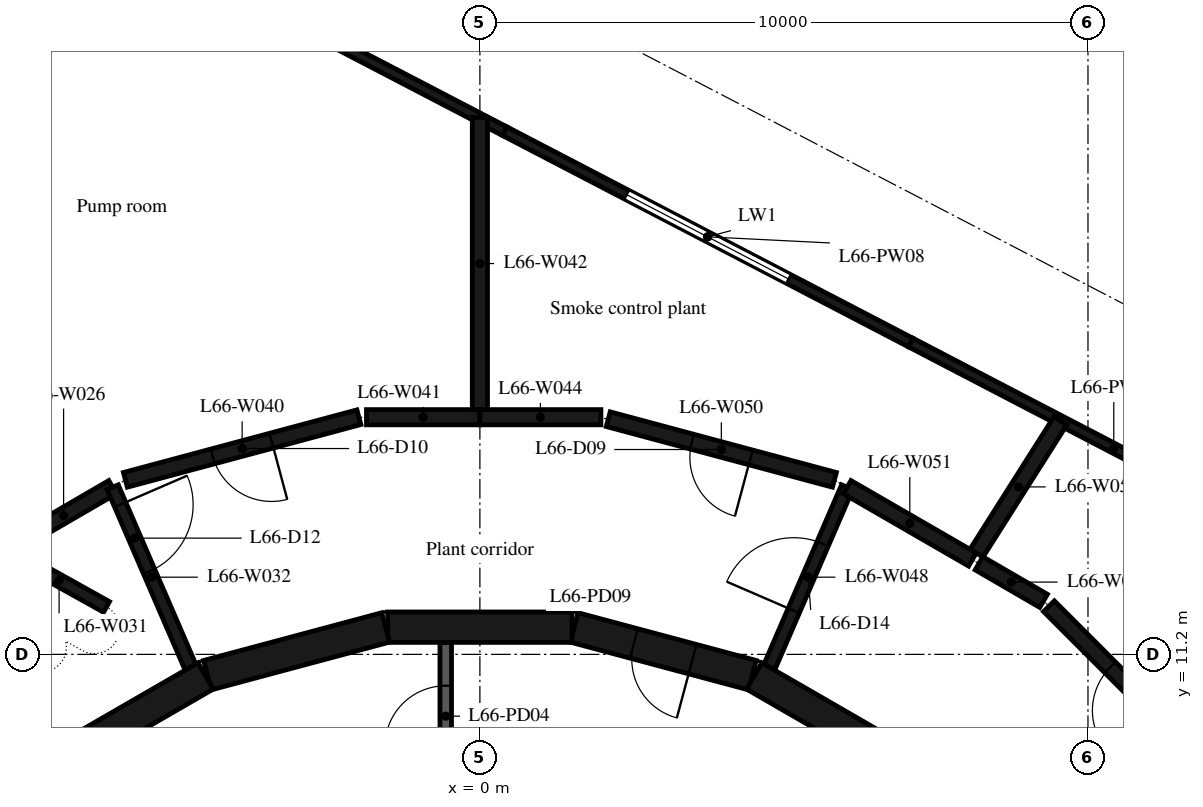
"""IFC4 building model, lengths in metres.
Left out: names, types, materials, properties, quantities, classifications, styles, units other than length and angle.
Written with IfcOpenShell. Run it as: python <this file> out.ifc"""

import sys

from ifc_helpers import new_model, si_unit, direction, frame, frame_2d, origin, place, context, subcontext, project, spatial, rectangle, extrude, element, fill, save


model = new_model("IFC4")
c1 = context("Model", 3, precision=1e-05, world=origin(), true_north=direction((0.0, 1.0)))
c2 = subcontext(c1, "Body", "Model", "MODEL_VIEW")
j1 = project(units=[si_unit("LENGTHUNIT", "METRE"), si_unit("PLANEANGLEUNIT", "RADIAN")], contexts=[c1])
p1 = place(None, origin())
s1 = spatial("IfcSite", under=j1, at=p1, CompositionType="ELEMENT")
p2 = place(p1, origin())
s2 = spatial("IfcBuilding", under=s1, at=p2, CompositionType="ELEMENT")
p3 = place(p2, frame((0.0, 0.0, 258.2)))
s3 = spatial("IfcBuildingStorey", under=s2, at=p3, CompositionType="ELEMENT", Elevation=258.2)
p4 = place(p3, frame((13.764, 12.851, 0.0), z_axis=(0.0, 0.0, 1.0), x_axis=(-0.887013408436, 0.461743666177, 0.0)))
e1 = element("IfcWall", 1, at=p4, inside=s3, PredefinedType="STANDARD", context=c2, shape_type="SweptSolid", body=[
    extrude(rectangle(XDim=7.53, YDim=0.16, at=frame_2d((3.765, 0.0))), origin(), (0.0, 0.0, 1.0), 4.75),
])
p5 = place(p4, frame((0.696, 0.0, 1.0)))
e2 = element("IfcOpeningElement", 2, at=p5, cuts=e1, PredefinedType="OPENING", context=c2, shape_type="SweptSolid", body=[
    extrude(rectangle(XDim=1.2, YDim=2.2, at=frame_2d((0.6, 1.1))), frame((0.0, 0.09, 0.0), z_axis=(0.0, -1.0, 0.0), x_axis=(1.0, 0.0, 0.0)), (0.0, 0.0, 1.0), 0.18),
])
p6 = place(p3, frame((7.085, 16.328, 0.0), z_axis=(0.0, 0.0, 1.0), x_axis=(-0.887019775052, 0.46173143565, 0.0)))
e3 = element("IfcWall", 3, at=p6, inside=s3, PredefinedType="STANDARD", context=c2, shape_type="SweptSolid", body=[
    extrude(rectangle(XDim=7.53, YDim=0.16, at=frame_2d((3.765, 0.0))), origin(), (0.0, 0.0, 1.0), 4.75),
])
p7 = place(p6, frame((2.265, 0.0, 1.0)))
e4 = element("IfcOpeningElement", 4, at=p7, cuts=e3, PredefinedType="OPENING", context=c2, shape_type="SweptSolid", body=[
    extrude(rectangle(XDim=3.0, YDim=2.2, at=frame_2d((1.5, 1.1))), frame((0.0, 0.09, 0.0), z_axis=(0.0, -1.0, 0.0), x_axis=(1.0, 0.0, 0.0)), (0.0, 0.0, 1.0), 0.18),
])
p8 = place(p3, frame((0.406, 19.805, 0.0), z_axis=(0.0, 0.0, 1.0), x_axis=(-0.88700649569, 0.461756945377, 0.0)))
e5 = element("IfcWall", 5, at=p8, inside=s3, PredefinedType="STANDARD", context=c2, shape_type="SweptSolid", body=[
    extrude(rectangle(XDim=7.53, YDim=0.16, at=frame_2d((3.765, 0.0))), origin(), (0.0, 0.0, 1.0), 4.75),
])
p9 = place(p8, frame((5.598, 0.0, 1.0)))
e6 = element("IfcOpeningElement", 6, at=p9, cuts=e5, PredefinedType="OPENING", context=c2, shape_type="SweptSolid", body=[
    extrude(rectangle(XDim=1.2, YDim=2.2, at=frame_2d((0.6, 1.1))), frame((0.0, 0.09, 0.0), z_axis=(0.0, -1.0, 0.0), x_axis=(1.0, 0.0, 0.0)), (0.0, 0.0, 1.0), 0.18),
])
p10 = place(p3, frame((7.137, 9.329, 0.0), z_axis=(0.0, 0.0, 1.0), x_axis=(-0.865975092491, 0.500087131594, 0.0)))
e7 = element("IfcWall", 7, at=p10, inside=s3, PredefinedType="SHEAR", context=c2, shape_type="SweptSolid", body=[
    extrude(rectangle(XDim=3.033, YDim=0.5, at=frame_2d((1.516, 0.0))), origin(), (0.0, 0.0, 1.0), 4.75),
])
p11 = place(p3, frame((4.479, 10.858, 0.0), z_axis=(0.0, 0.0, 1.0), x_axis=(-0.965948410781, 0.258734743916, 0.0)))
e8 = element("IfcWall", 8, at=p11, inside=s3, PredefinedType="SHEAR", context=c2, shape_type="SweptSolid", body=[
    extrude(rectangle(XDim=3.033, YDim=0.5, at=frame_2d((1.516, 0.0))), origin(), (0.0, 0.0, 1.0), 4.75),
])
p12 = place(p11, frame((1.016, 0.0, 0.0)))
e9 = element("IfcOpeningElement", 9, at=p12, cuts=e8, PredefinedType="OPENING", context=c2, shape_type="SweptSolid", body=[
    extrude(rectangle(XDim=1.0, YDim=2.4, at=frame_2d((0.5, 1.2))), frame((0.0, 0.26, 0.0), z_axis=(0.0, -1.0, 0.0), x_axis=(1.0, 0.0, 0.0)), (0.0, 0.0, 1.0), 0.52),
])
for number, where, z_axis, x_axis in (
    (10, (1.516, 11.647, 0.0), (0.0, 0.0, 1.0), (-1.0, 0.0, 0.0)),
    (11, (-1.55, 11.643, 0.0), (0.0, 0.0, 1.0), (-0.966, -0.259, 0.0)),
    (12, (-4.51, 10.845, 0.0), (0.0, 0.0, 1.0), (-0.866, -0.5, 0.0)),
):
    element("IfcWall", number, at=place(p3, frame(where, z_axis=z_axis, x_axis=x_axis)), inside=s3, PredefinedType="SHEAR", context=c2, shape_type="SweptSolid", body=[
        extrude(rectangle(XDim=3.033, YDim=0.5, at=frame_2d((1.516, 0.0))), origin(), (0.0, 0.0, 1.0), 4.75),
    ])
p13 = place(p3, frame((-0.562, 8.97, 0.0), z_axis=(0.0, 0.0, 1.0), x_axis=(0.0, 1.0, 0.0)))
e13 = element("IfcWall", 13, at=p13, inside=s3, PredefinedType="PARTITIONING", context=c2, shape_type="SweptSolid", body=[
    extrude(rectangle(XDim=2.427, YDim=0.19, at=frame_2d((1.214, 0.0))), origin(), (0.0, 0.0, 1.0), 4.75),
])
p14 = place(p13, frame((0.714, 0.0, 0.0)))
e14 = element("IfcOpeningElement", 14, at=p14, cuts=e13, PredefinedType="OPENING", context=c2, shape_type="SweptSolid", body=[
    extrude(rectangle(XDim=1.0, YDim=2.4, at=frame_2d((0.5, 1.2))), frame((0.0, 0.105, 0.0), z_axis=(0.0, -1.0, 0.0), x_axis=(1.0, 0.0, 0.0)), (0.0, 0.0, 1.0), 0.21),
])
p15 = place(p3, frame((-7.652, 13.013, 0.0), z_axis=(0.0, 0.0, 1.0), x_axis=(0.864528358021, 0.50258404091, 0.0)))
e15 = element("IfcWall", 15, at=p15, inside=s3, PredefinedType="PARTITIONING", context=c2, shape_type="SweptSolid", body=[
    extrude(rectangle(XDim=1.865, YDim=0.25, at=frame_2d((0.932, 0.0))), origin(), (0.0, 0.0, 1.0), 4.75),
])
p16 = place(p3, frame((-6.14, 11.98, 0.0), z_axis=(0.0, 0.0, 1.0), x_axis=(-0.873343748456, 0.487104400547, 0.0)))
e16 = element("IfcWall", 16, at=p16, inside=s3, PredefinedType="PARTITIONING", context=c2, shape_type="SweptSolid", body=[
    extrude(rectangle(XDim=1.786, YDim=0.2, at=frame_2d((0.893, 0.0))), origin(), (0.0, 0.0, 1.0), 4.75),
])
p17 = place(p3, frame((-6.039, 13.948, 0.0), z_axis=(0.0, 0.0, 1.0), x_axis=(0.396897353622, -0.917863002135, 0.0)))
e17 = element("IfcWall", 17, at=p17, inside=s3, PredefinedType="PARTITIONING", context=c2, shape_type="SweptSolid", body=[
    extrude(rectangle(XDim=3.223, YDim=0.2, at=frame_2d((1.612, 0.0))), origin(), (0.0, 0.0, 1.0), 4.75),
])
p18 = place(p17, frame((0.312, 0.0, 0.0)))
e18 = element("IfcOpeningElement", 18, at=p18, cuts=e17, PredefinedType="OPENING", context=c2, shape_type="SweptSolid", body=[
    extrude(rectangle(XDim=1.2, YDim=2.1, at=frame_2d((0.6, 1.05))), frame((0.0, 0.11, 0.0), z_axis=(0.0, -1.0, 0.0), x_axis=(1.0, 0.0, 0.0)), (0.0, 0.0, 1.0), 0.22),
])
p19 = place(p3, frame((-1.99, 15.1, 0.0), z_axis=(0.0, 0.0, 1.0), x_axis=(-0.965857829358, -0.259072679895, 0.0)))
e19 = element("IfcWall", 19, at=p19, inside=s3, PredefinedType="PARTITIONING", context=c2, shape_type="SweptSolid", body=[
    extrude(rectangle(XDim=3.976, YDim=0.25, at=frame_2d((1.988, 0.0))), origin(), (0.0, 0.0, 1.0), 4.75),
])
p20 = place(p19, frame((1.488, 0.0, 0.0)))
e20 = element("IfcOpeningElement", 20, at=p20, cuts=e19, PredefinedType="OPENING", context=c2, shape_type="SweptSolid", body=[
    extrude(rectangle(XDim=1.0, YDim=2.1, at=frame_2d((0.5, 1.05))), frame((0.0, 0.135, 0.0), z_axis=(0.0, -1.0, 0.0), x_axis=(1.0, 0.0, 0.0)), (0.0, 0.0, 1.0), 0.27),
])
p21 = place(p3, frame((0.0, 15.1, 0.0), z_axis=(0.0, 0.0, 1.0), x_axis=(-1.0, 0.0, 0.0)))
e21 = element("IfcWall", 21, at=p21, inside=s3, PredefinedType="PARTITIONING", context=c2, shape_type="SweptSolid", body=[
    extrude(rectangle(XDim=1.865, YDim=0.25, at=frame_2d((0.933, 0.0))), origin(), (0.0, 0.0, 1.0), 4.75),
])
p22 = place(p3, frame((0.0, 15.225, 0.0), z_axis=(0.0, 0.0, 1.0), x_axis=(0.0, 1.0, 0.0)))
e22 = element("IfcWall", 22, at=p22, inside=s3, PredefinedType="PARTITIONING", context=c2, shape_type="SweptSolid", body=[
    extrude(rectangle(XDim=4.805, YDim=0.25, at=frame_2d((2.402, 0.0))), origin(), (0.0, 0.0, 1.0), 4.75),
])
p23 = place(p3, frame((1.99, 15.1, 0.0), z_axis=(0.0, 0.0, 1.0), x_axis=(-1.0, 0.0, 0.0)))
e23 = element("IfcWall", 23, at=p23, inside=s3, PredefinedType="PARTITIONING", context=c2, shape_type="SweptSolid", body=[
    extrude(rectangle(XDim=1.99, YDim=0.25, at=frame_2d((0.995, 0.0))), origin(), (0.0, 0.0, 1.0), 4.75),
])
p24 = place(p3, frame((4.76, 10.99, 0.0), z_axis=(0.0, 0.0, 1.0), x_axis=(0.396905977672, 0.917859272922, 0.0)))
e24 = element("IfcWall", 24, at=p24, inside=s3, PredefinedType="PARTITIONING", context=c2, shape_type="SweptSolid", body=[
    extrude(rectangle(XDim=3.224, YDim=0.2, at=frame_2d((1.612, 0.0))), origin(), (0.0, 0.0, 1.0), 4.75),
])
p25 = place(p24, frame((1.012, 0.0, 0.0)))
e25 = element("IfcOpeningElement", 25, at=p25, cuts=e24, PredefinedType="OPENING", context=c2, shape_type="SweptSolid", body=[
    extrude(rectangle(XDim=1.2, YDim=2.1, at=frame_2d((0.6, 1.05))), frame((0.0, 0.11, 0.0), z_axis=(0.0, -1.0, 0.0), x_axis=(1.0, 0.0, 0.0)), (0.0, 0.0, 1.0), 0.22),
])
p26 = place(p3, frame((5.83, 14.07, 0.0), z_axis=(0.0, 0.0, 1.0), x_axis=(-0.965861411942, 0.259059323171, 0.0)))
e26 = element("IfcWall", 26, at=p26, inside=s3, PredefinedType="PARTITIONING", context=c2, shape_type="SweptSolid", body=[
    extrude(rectangle(XDim=3.851, YDim=0.25, at=frame_2d((1.925, 0.0))), origin(), (0.0, 0.0, 1.0), 4.75),
])
p27 = place(p26, frame((1.425, 0.0, 0.0)))
e27 = element("IfcOpeningElement", 27, at=p27, cuts=e26, PredefinedType="OPENING", context=c2, shape_type="SweptSolid", body=[
    extrude(rectangle(XDim=1.0, YDim=2.1, at=frame_2d((0.5, 1.05))), frame((0.0, 0.135, 0.0), z_axis=(0.0, -1.0, 0.0), x_axis=(1.0, 0.0, 0.0)), (0.0, 0.0, 1.0), 0.27),
])
p28 = place(p3, frame((6.04, 13.95, 0.0), z_axis=(0.0, 0.0, 1.0), x_axis=(0.865922362496, -0.500178430292, 0.0)))
e28 = element("IfcWall", 28, at=p28, inside=s3, PredefinedType="PARTITIONING", context=c2, shape_type="SweptSolid", body=[
    extrude(rectangle(XDim=2.379, YDim=0.25, at=frame_2d((1.189, 0.0))), origin(), (0.0, 0.0, 1.0), 4.75),
])
p29 = place(p3, frame((8.167, 12.865, 0.0), z_axis=(0.0, 0.0, 1.0), x_axis=(0.535428337452, 0.844580662491, 0.0)))
e29 = element("IfcWall", 29, at=p29, inside=s3, PredefinedType="PARTITIONING", context=c2, shape_type="SweptSolid", body=[
    extrude(rectangle(XDim=2.578, YDim=0.25, at=frame_2d((1.289, 0.0))), origin(), (0.0, 0.0, 1.0), 4.75),
])
p30 = place(p3, frame((9.27, 12.08, 0.0), z_axis=(0.0, 0.0, 1.0), x_axis=(-0.864599561852, 0.502461538474, 0.0)))
e30 = element("IfcWall", 30, at=p30, inside=s3, PredefinedType="PARTITIONING", context=c2, shape_type="SweptSolid", body=[
    extrude(rectangle(XDim=1.228, YDim=0.25, at=frame_2d((0.614, 0.0))), origin(), (0.0, 0.0, 1.0), 4.75),
])
p31 = place(p3, frame((12.08, 9.27, 0.0), z_axis=(0.0, 0.0, 1.0), x_axis=(-0.707106781187, 0.707106781187, 0.0)))
e31 = element("IfcWall", 31, at=p31, inside=s3, PredefinedType="PARTITIONING", context=c2, shape_type="SweptSolid", body=[
    extrude(rectangle(XDim=3.849, YDim=0.25, at=frame_2d((1.925, 0.0))), origin(), (0.0, 0.0, 1.0), 4.75),
])
p32 = place(p31, frame((1.425, 0.0, 0.0)))
e32 = element("IfcOpeningElement", 32, at=p32, cuts=e31, PredefinedType="OPENING", context=c2, shape_type="SweptSolid", body=[
    extrude(rectangle(XDim=1.0, YDim=2.1, at=frame_2d((0.5, 1.05))), frame((0.0, 0.135, 0.0), z_axis=(0.0, -1.0, 0.0), x_axis=(1.0, 0.0, 0.0)), (0.0, 0.0, 1.0), 0.27),
])
p33 = place(p7, origin())
e33 = element("IfcWindow", 33, at=p33, inside=s3, PartitioningType="SINGLE_PANEL", PredefinedType="WINDOW", context=c2, shape_type="SweptSolid", body=[
    extrude(rectangle(XDim=3.0, YDim=2.2, at=frame_2d((1.5, 1.1))), frame((0.0, 0.03, 0.0), z_axis=(0.0, -1.0, 0.0), x_axis=(1.0, 0.0, 0.0)), (0.0, 0.0, 1.0), 0.06),
])
fill(e4, e33)
p34 = place(p14, origin())
e34 = element("IfcDoor", 34, at=p34, inside=s3, OperationType="SINGLE_SWING_RIGHT", PredefinedType="DOOR", context=c2, shape_type="SweptSolid", body=[
    extrude(rectangle(XDim=1.0, YDim=2.4, at=frame_2d((0.5, 1.2))), frame((0.0, 0.025, 0.0), z_axis=(0.0, -1.0, 0.0), x_axis=(1.0, 0.0, 0.0)), (0.0, 0.0, 1.0), 0.05),
])
fill(e14, e34)
p35 = place(p12, origin())
e35 = element("IfcDoor", 35, at=p35, inside=s3, OperationType="SINGLE_SWING_LEFT", PredefinedType="DOOR", context=c2, shape_type="SweptSolid", body=[
    extrude(rectangle(XDim=1.0, YDim=2.4, at=frame_2d((0.5, 1.2))), frame((0.0, 0.025, 0.0), z_axis=(0.0, -1.0, 0.0), x_axis=(1.0, 0.0, 0.0)), (0.0, 0.0, 1.0), 0.05),
])
fill(e9, e35)
p36 = place(p32, origin())
e36 = element("IfcDoor", 36, at=p36, inside=s3, OperationType="SINGLE_SWING_LEFT", PredefinedType="DOOR", context=c2, shape_type="SweptSolid", body=[
    extrude(rectangle(XDim=1.0, YDim=2.1, at=frame_2d((0.5, 1.05))), frame((0.0, 0.025, 0.0), z_axis=(0.0, -1.0, 0.0), x_axis=(1.0, 0.0, 0.0)), (0.0, 0.0, 1.0), 0.05),
])
fill(e32, e36)
p37 = place(p27, origin())
e37 = element("IfcDoor", 37, at=p37, inside=s3, OperationType="SINGLE_SWING_LEFT", PredefinedType="DOOR", context=c2, shape_type="SweptSolid", body=[
    extrude(rectangle(XDim=1.0, YDim=2.1, at=frame_2d((0.5, 1.05))), frame((0.0, 0.025, 0.0), z_axis=(0.0, -1.0, 0.0), x_axis=(1.0, 0.0, 0.0)), (0.0, 0.0, 1.0), 0.05),
])
fill(e27, e37)
p38 = place(p20, origin())
e38 = element("IfcDoor", 38, at=p38, inside=s3, OperationType="SINGLE_SWING_LEFT", PredefinedType="DOOR", context=c2, shape_type="SweptSolid", body=[
    extrude(rectangle(XDim=1.0, YDim=2.1, at=frame_2d((0.5, 1.05))), frame((0.0, 0.025, 0.0), z_axis=(0.0, -1.0, 0.0), x_axis=(1.0, 0.0, 0.0)), (0.0, 0.0, 1.0), 0.05),
])
fill(e20, e38)
p39 = place(p18, origin())
e39 = element("IfcDoor", 39, at=p39, inside=s3, OperationType="SINGLE_SWING_LEFT", PredefinedType="DOOR", context=c2, shape_type="SweptSolid", body=[
    extrude(rectangle(XDim=1.2, YDim=2.1, at=frame_2d((0.6, 1.05))), frame((0.0, 0.025, 0.0), z_axis=(0.0, -1.0, 0.0), x_axis=(1.0, 0.0, 0.0)), (0.0, 0.0, 1.0), 0.05),
])
fill(e18, e39)
p40 = place(p25, origin())
e40 = element("IfcDoor", 40, at=p40, inside=s3, OperationType="SINGLE_SWING_LEFT", PredefinedType="DOOR", context=c2, shape_type="SweptSolid", body=[
    extrude(rectangle(XDim=1.2, YDim=2.1, at=frame_2d((0.6, 1.05))), frame((0.0, 0.025, 0.0), z_axis=(0.0, -1.0, 0.0), x_axis=(1.0, 0.0, 0.0)), (0.0, 0.0, 1.0), 0.05),
])
fill(e25, e40)
save(model, sys.argv[1])
